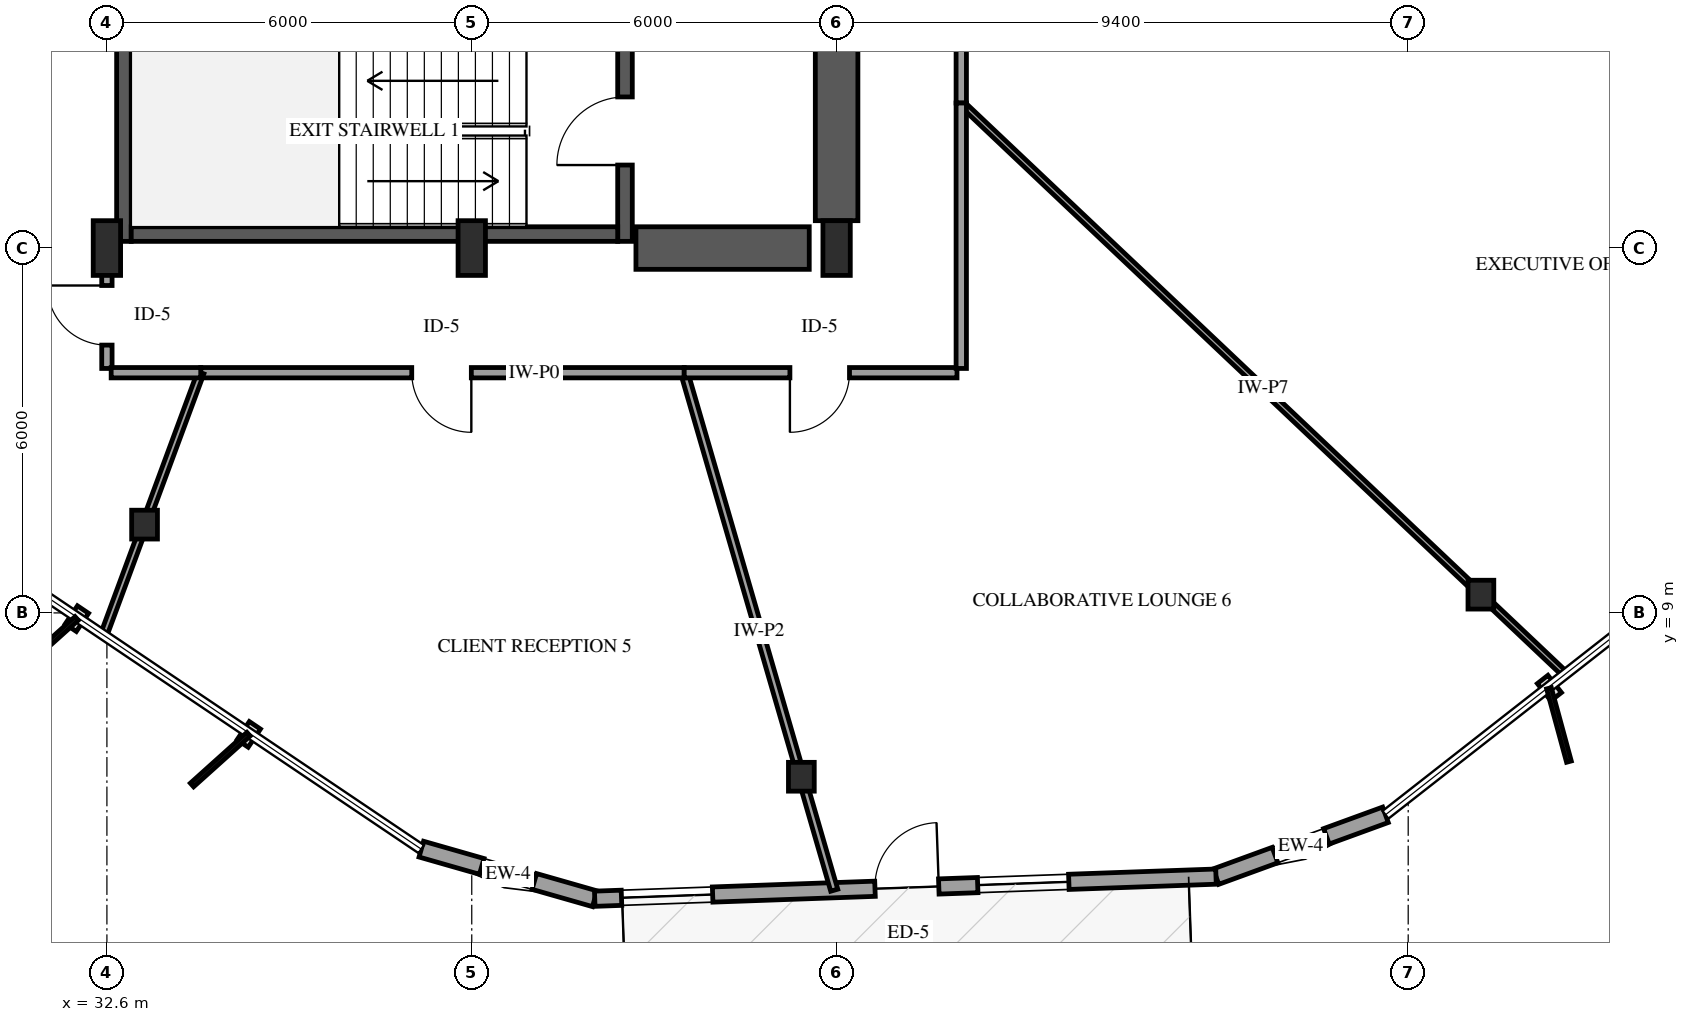
"""IFC4 building model, lengths in metres.
Left out: names, types, materials, properties, quantities, classifications, styles, units other than length and angle.
Written with IfcOpenShell. Run it as: python <this file> out.ifc"""

import sys

from ifc_helpers import new_model, si_unit, direction, frame, frame_2d, origin, origin_2d, place, context, subcontext, project, spatial, rectangle, i_section, extrude, element, fill, save


model = new_model("IFC4")
c1 = context("Model", 3, precision=1e-05, world=origin(), true_north=direction((0.0, 1.0)))
c2 = subcontext(c1, "Body", "Model", "MODEL_VIEW")
j1 = project(units=[si_unit("LENGTHUNIT", "METRE"), si_unit("PLANEANGLEUNIT", "RADIAN")], contexts=[c1])
p1 = place(None, origin())
s1 = spatial("IfcSite", under=j1, at=p1, CompositionType="ELEMENT")
p2 = place(p1, origin())
s2 = spatial("IfcBuilding", under=s1, at=p2, CompositionType="ELEMENT")
p3 = place(p2, frame((0.0, 0.0, 34.6)))
s3 = spatial("IfcBuildingStorey", under=s2, at=p3, CompositionType="ELEMENT", Elevation=34.6)
p4 = place(p3, frame((32.88, 15.11, 0.0), z_axis=(0.0, 0.0, 1.0), x_axis=(0.0, 1.0, 0.0)))
e1 = element("IfcWall", 1, at=p4, inside=s3, PredefinedType="SHEAR", context=c2, shape_type="SweptSolid", body=[
    extrude(rectangle(XDim=3.63, YDim=0.24, at=frame_2d((1.815, 0.0))), origin(), (0.0, 0.0, 1.0), 4.0),
])
p5 = place(p3, frame((41.12, 15.11, 0.0), z_axis=(0.0, 0.0, 1.0), x_axis=(0.0, 1.0, 0.0)))
e2 = element("IfcWall", 2, at=p5, inside=s3, PredefinedType="SHEAR", context=c2, shape_type="SweptSolid", body=[
    extrude(rectangle(XDim=3.63, YDim=0.24, at=frame_2d((1.815, 0.0))), origin(), (0.0, 0.0, 1.0), 4.0),
])
p6 = place(p5, frame((1.255, 0.0, 0.0)))
e3 = element("IfcOpeningElement", 3, at=p6, cuts=e2, PredefinedType="OPENING", context=c2, shape_type="SweptSolid", body=[
    extrude(rectangle(XDim=1.12, YDim=2.15, at=frame_2d((0.56, 1.075))), frame((0.0, 0.13, 0.0), z_axis=(0.0, -1.0, 0.0), x_axis=(1.0, 0.0, 0.0)), (0.0, 0.0, 1.0), 0.26),
])
p7 = place(p3, frame((33.0, 15.23, 0.0), z_axis=(0.0, 0.0, 1.0), x_axis=(1.0, 0.0, 0.0)))
e4 = element("IfcWall", 4, at=p7, inside=s3, PredefinedType="SHEAR", context=c2, shape_type="SweptSolid", body=[
    extrude(rectangle(XDim=8.0, YDim=0.24, at=frame_2d((4.0, 0.0))), origin(), (0.0, 0.0, 1.0), 4.0),
])
p8 = place(p3, frame((41.3, 15.0, 0.0), z_axis=(0.0, 0.0, 1.0), x_axis=(1.0, 0.0, 0.0)))
e5 = element("IfcWall", 5, at=p8, inside=s3, PredefinedType="SHEAR", context=c2, shape_type="SweptSolid", body=[
    extrude(rectangle(XDim=2.85, YDim=0.7, at=frame_2d((1.425, 0.0))), origin(), (0.0, 0.0, 1.0), 4.0),
])
p9 = place(p3, frame((44.6, 15.45, 0.0), z_axis=(0.0, 0.0, 1.0), x_axis=(0.0, 1.0, 0.0)))
e6 = element("IfcWall", 6, at=p9, inside=s3, PredefinedType="SHEAR", context=c2, shape_type="SweptSolid", body=[
    extrude(rectangle(XDim=6.35, YDim=0.7, at=frame_2d((3.175, 0.0))), origin(), (0.0, 0.0, 1.0), 4.0),
])
for number, where, z_axis, x_axis in (
    (7, (32.6, 15.0, 0.0), (0.0, 0.0, 1.0), (1.0, 0.0, 0.0)),
    (8, (38.6, 15.0, 0.0), (0.0, 0.0, 1.0), (1.0, 0.0, 0.0)),
    (9, (44.6, 15.0, 0.0), (0.0, 0.0, 1.0), (1.0, 0.0, 0.0)),
):
    element("IfcColumn", number, at=place(p3, frame(where, z_axis=z_axis, x_axis=x_axis)), inside=s3, PredefinedType="PILASTER", context=c2, shape_type="SweptSolid", body=[
        extrude(rectangle(XDim=0.45, YDim=0.9, at=origin_2d()), origin(), (0.0, 0.0, 1.0), 4.0),
    ])
for number, where, z_axis, x_axis in (
    (10, (33.219, 10.452, 0.0), (0.0, 0.0, 1.0), (1.0, 0.0, 0.0)),
    (11, (44.02, 6.306, 0.0), (0.0, 0.0, 1.0), (1.0, 0.0, 0.0)),
    (12, (55.196, 9.3, 0.0), (0.0, 0.0, 1.0), (1.0, 0.0, 0.0)),
):
    element("IfcColumn", number, at=place(p3, frame(where, z_axis=z_axis, x_axis=x_axis)), inside=s3, PredefinedType="COLUMN", context=c2, shape_type="SweptSolid", body=[
        extrude(i_section(OverallWidth=0.424, OverallDepth=0.474, WebThickness=0.048, FlangeThickness=0.077, FilletRadius=0.038, at=origin_2d()), origin(), (0.0, 0.0, 1.0), 4.0),
    ])
p10 = place(p3, frame((37.771, 5.115, 0.0), z_axis=(0.0, 0.0, 1.0), x_axis=(0.961452483174, -0.274971130481, 0.0)))
e13 = element("IfcWall", 13, at=p10, inside=s3, PredefinedType="SOLIDWALL", context=c2, shape_type="SweptSolid", body=[
    extrude(rectangle(XDim=2.966, YDim=0.27, at=frame_2d((1.483, 0.0))), origin(), (0.0, 0.0, 1.0), 3.079),
])
p11 = place(p10, frame((1.033, 0.0, 0.75)))
e14 = element("IfcOpeningElement", 14, at=p11, cuts=e13, PredefinedType="OPENING", context=c2, shape_type="SweptSolid", body=[
    extrude(rectangle(XDim=0.9, YDim=1.5, at=frame_2d((0.45, 0.75))), frame((0.0, 0.145, 0.0), z_axis=(0.0, -1.0, 0.0), x_axis=(1.0, 0.0, 0.0)), (0.0, 0.0, 1.0), 0.29),
])
p12 = place(p3, frame((50.839, 4.663, 0.0), z_axis=(0.0, 0.0, 1.0), x_axis=(0.939456588186, 0.342667942642, 0.0)))
e15 = element("IfcWall", 15, at=p12, inside=s3, PredefinedType="SOLIDWALL", context=c2, shape_type="SweptSolid", body=[
    extrude(rectangle(XDim=2.967, YDim=0.27, at=frame_2d((1.483, 0.0))), origin(), (0.0, 0.0, 1.0), 3.079),
])
p13 = place(p12, frame((1.033, 0.0, 0.75)))
e16 = element("IfcOpeningElement", 16, at=p13, cuts=e15, PredefinedType="OPENING", context=c2, shape_type="SweptSolid", body=[
    extrude(rectangle(XDim=0.9, YDim=1.5, at=frame_2d((0.45, 0.75))), frame((0.0, 0.145, 0.0), z_axis=(0.0, -1.0, 0.0), x_axis=(1.0, 0.0, 0.0)), (0.0, 0.0, 1.0), 0.29),
])
p14 = place(p3, frame((40.623, 4.3, 0.0), z_axis=(0.0, 0.0, 1.0), x_axis=(0.999366712114, 0.035583348891, 0.0)))
e17 = element("IfcWall", 17, at=p14, inside=s3, PredefinedType="SOLIDWALL", context=c2, shape_type="SweptSolid", body=[
    extrude(rectangle(XDim=10.223, YDim=0.25, at=frame_2d((5.112, 0.0))), origin(), (0.0, 0.0, 1.0), 3.079),
])
p15 = place(p14, frame((4.612, 0.0, 0.0)))
e18 = element("IfcOpeningElement", 18, at=p15, cuts=e17, PredefinedType="OPENING", context=c2, shape_type="SweptSolid", body=[
    extrude(rectangle(XDim=1.05, YDim=2.15, at=frame_2d((0.525, 1.075))), frame((0.0, 0.135, 0.0), z_axis=(0.0, -1.0, 0.0), x_axis=(1.0, 0.0, 0.0)), (0.0, 0.0, 1.0), 0.27),
])
p16 = place(p14, frame((0.44, 0.0, 0.72)))
e19 = element("IfcOpeningElement", 19, at=p16, cuts=e17, PredefinedType="OPENING", context=c2, shape_type="SweptSolid", body=[
    extrude(rectangle(XDim=1.5, YDim=1.7, at=frame_2d((0.75, 0.85))), frame((0.0, 0.135, 0.0), z_axis=(0.0, -1.0, 0.0), x_axis=(1.0, 0.0, 0.0)), (0.0, 0.0, 1.0), 0.27),
])
p17 = place(p14, frame((6.302, 0.0, 0.72)))
e20 = element("IfcOpeningElement", 20, at=p17, cuts=e17, PredefinedType="OPENING", context=c2, shape_type="SweptSolid", body=[
    extrude(rectangle(XDim=1.5, YDim=1.7, at=frame_2d((0.75, 0.85))), frame((0.0, 0.135, 0.0), z_axis=(0.0, -1.0, 0.0), x_axis=(1.0, 0.0, 0.0)), (0.0, 0.0, 1.0), 0.27),
])
p18 = place(p3, frame((46.65, 22.738, 0.0), z_axis=(0.0, 0.0, 1.0), x_axis=(0.962725350361, -0.270480867666, 0.0)))
e21 = element("IfcWall", 21, at=p18, inside=s3, PredefinedType="PARTITIONING", context=c2, shape_type="SweptSolid", body=[
    extrude(rectangle(XDim=18.323, YDim=0.11, at=frame_2d((9.162, 0.0))), origin(), (0.0, 0.0, 1.0), 2.995),
])
p19 = place(p3, frame((46.65, 17.385, 0.0), z_axis=(0.0, 0.0, 1.0), x_axis=(0.726445282298, -0.687224309688, 0.0)))
e22 = element("IfcWall", 22, at=p19, inside=s3, PredefinedType="PARTITIONING", context=c2, shape_type="SweptSolid", body=[
    extrude(rectangle(XDim=13.669, YDim=0.1, at=frame_2d((6.835, 0.0))), origin(), (0.0, 0.0, 1.0), 2.995),
])
p20 = place(p3, frame((42.094, 12.95, 0.0), z_axis=(0.0, 0.0, 1.0), x_axis=(0.278434728373, -0.960455153579, 0.0)))
e23 = element("IfcWall", 23, at=p20, inside=s3, PredefinedType="PARTITIONING", context=c2, shape_type="SweptSolid", body=[
    extrude(rectangle(XDim=8.86, YDim=0.12, at=frame_2d((4.43, 0.0))), origin(), (0.0, 0.0, 1.0), 2.995),
])
p21 = place(p3, frame((42.094, 12.95, 0.0), z_axis=(0.0, 0.0, 1.0), x_axis=(-1.0, 0.0, 0.0)))
e24 = element("IfcWall", 24, at=p21, inside=s3, PredefinedType="PARTITIONING", context=c2, shape_type="SweptSolid", body=[
    extrude(rectangle(XDim=7.951, YDim=0.17, at=frame_2d((3.976, 0.0))), origin(), (0.0, 0.0, 1.0), 3.7),
])
p22 = place(p21, frame((3.501, 0.0, 0.0)))
e25 = element("IfcOpeningElement", 25, at=p22, cuts=e24, PredefinedType="OPENING", context=c2, shape_type="SweptSolid", body=[
    extrude(rectangle(XDim=0.98, YDim=2.15, at=frame_2d((0.49, 1.075))), frame((0.0, 0.095, 0.0), z_axis=(0.0, -1.0, 0.0), x_axis=(1.0, 0.0, 0.0)), (0.0, 0.0, 1.0), 0.19),
])
p23 = place(p3, frame((46.65, 22.738, 0.0), z_axis=(0.0, 0.0, 1.0), x_axis=(0.0, -1.0, 0.0)))
e26 = element("IfcWall", 26, at=p23, inside=s3, PredefinedType="PARTITIONING", context=c2, shape_type="SweptSolid", body=[
    extrude(rectangle(XDim=5.353, YDim=0.17, at=frame_2d((2.677, 0.0))), origin(), (0.0, 0.0, 1.0), 3.7),
])
p24 = place(p23, frame((2.201, 0.0, 0.0)))
e27 = element("IfcOpeningElement", 27, at=p24, cuts=e26, PredefinedType="OPENING", context=c2, shape_type="SweptSolid", body=[
    extrude(rectangle(XDim=0.98, YDim=2.15, at=frame_2d((0.49, 1.075))), frame((0.0, 0.095, 0.0), z_axis=(0.0, -1.0, 0.0), x_axis=(1.0, 0.0, 0.0)), (0.0, 0.0, 1.0), 0.19),
])
p25 = place(p3, frame((34.143, 12.95, 0.0), z_axis=(0.0, 0.0, 1.0), x_axis=(-0.347062077262, -0.937842158642, 0.0)))
e28 = element("IfcWall", 28, at=p25, inside=s3, PredefinedType="PARTITIONING", context=c2, shape_type="SweptSolid", body=[
    extrude(rectangle(XDim=4.602, YDim=0.11, at=frame_2d((2.301, 0.0))), origin(), (0.0, 0.0, 1.0), 2.995),
])
p26 = place(p3, frame((46.58, 12.95, 0.0), z_axis=(0.0, 0.0, 1.0), x_axis=(-1.0, 0.0, 0.0)))
e29 = element("IfcWall", 29, at=p26, inside=s3, PredefinedType="PARTITIONING", context=c2, shape_type="SweptSolid", body=[
    extrude(rectangle(XDim=4.486, YDim=0.17, at=frame_2d((2.243, 0.0))), origin(), (0.0, 0.0, 1.0), 3.7),
])
p27 = place(p26, frame((1.768, 0.0, 0.0)))
e30 = element("IfcOpeningElement", 30, at=p27, cuts=e29, PredefinedType="OPENING", context=c2, shape_type="SweptSolid", body=[
    extrude(rectangle(XDim=0.98, YDim=2.15, at=frame_2d((0.49, 1.075))), frame((0.0, 0.095, 0.0), z_axis=(0.0, -1.0, 0.0), x_axis=(1.0, 0.0, 0.0)), (0.0, 0.0, 1.0), 0.19),
])
p28 = place(p3, frame((46.65, 17.385, 0.0), z_axis=(0.0, 0.0, 1.0), x_axis=(0.0, -1.0, 0.0)))
e31 = element("IfcWall", 31, at=p28, inside=s3, PredefinedType="PARTITIONING", context=c2, shape_type="SweptSolid", body=[
    extrude(rectangle(XDim=4.365, YDim=0.17, at=frame_2d((2.183, 0.0))), origin(), (0.0, 0.0, 1.0), 3.7),
])
p29 = place(p3, frame((32.6, 13.02, 0.0), z_axis=(0.0, 0.0, 1.0), x_axis=(0.0, 1.0, 0.0)))
e32 = element("IfcWall", 32, at=p29, inside=s3, PredefinedType="PARTITIONING", context=c2, shape_type="SweptSolid", body=[
    extrude(rectangle(XDim=1.91, YDim=0.17, at=frame_2d((0.955, 0.0))), origin(), (0.0, 0.0, 1.0), 3.7),
])
p30 = place(p29, frame((0.384, 0.0, 0.0)))
e33 = element("IfcOpeningElement", 33, at=p30, cuts=e32, PredefinedType="OPENING", context=c2, shape_type="SweptSolid", body=[
    extrude(rectangle(XDim=0.98, YDim=2.15, at=frame_2d((0.49, 1.075))), frame((0.0, 0.095, 0.0), z_axis=(0.0, -1.0, 0.0), x_axis=(1.0, 0.0, 0.0)), (0.0, 0.0, 1.0), 0.19),
])
p31 = place(p3, frame((34.143, 12.95, 0.0), z_axis=(0.0, 0.0, 1.0), x_axis=(-1.0, 0.0, 0.0)))
e34 = element("IfcWall", 34, at=p31, inside=s3, PredefinedType="PARTITIONING", context=c2, shape_type="SweptSolid", body=[
    extrude(rectangle(XDim=1.473, YDim=0.17, at=frame_2d((0.737, 0.0))), origin(), (0.0, 0.0, 1.0), 3.7),
])
p32 = place(p11, origin())
e35 = element("IfcWindow", 35, at=p32, inside=s3, PartitioningType="SINGLE_PANEL", PredefinedType="WINDOW", context=c2, shape_type="SweptSolid", body=[
    extrude(rectangle(XDim=0.9, YDim=1.5, at=frame_2d((0.45, 0.75))), frame((0.0, 0.03, 0.0), z_axis=(0.0, -1.0, 0.0), x_axis=(1.0, 0.0, 0.0)), (0.0, 0.0, 1.0), 0.06),
])
fill(e14, e35)
p33 = place(p13, origin())
e36 = element("IfcWindow", 36, at=p33, inside=s3, PartitioningType="SINGLE_PANEL", PredefinedType="WINDOW", context=c2, shape_type="SweptSolid", body=[
    extrude(rectangle(XDim=0.9, YDim=1.5, at=frame_2d((0.45, 0.75))), frame((0.0, 0.03, 0.0), z_axis=(0.0, -1.0, 0.0), x_axis=(1.0, 0.0, 0.0)), (0.0, 0.0, 1.0), 0.06),
])
fill(e16, e36)
p34 = place(p15, origin())
e37 = element("IfcDoor", 37, at=p34, inside=s3, OperationType="SINGLE_SWING_RIGHT", PredefinedType="DOOR", context=c2, shape_type="SweptSolid", body=[
    extrude(rectangle(XDim=1.05, YDim=2.15, at=frame_2d((0.525, 1.075))), frame((0.0, 0.025, 0.0), z_axis=(0.0, -1.0, 0.0), x_axis=(1.0, 0.0, 0.0)), (0.0, 0.0, 1.0), 0.05),
])
fill(e18, e37)
p35 = place(p16, origin())
e38 = element("IfcWindow", 38, at=p35, inside=s3, PartitioningType="SINGLE_PANEL", PredefinedType="WINDOW", context=c2, shape_type="SweptSolid", body=[
    extrude(rectangle(XDim=1.5, YDim=1.7, at=frame_2d((0.75, 0.85))), frame((0.0, 0.03, 0.0), z_axis=(0.0, -1.0, 0.0), x_axis=(1.0, 0.0, 0.0)), (0.0, 0.0, 1.0), 0.06),
])
fill(e19, e38)
p36 = place(p17, origin())
e39 = element("IfcWindow", 39, at=p36, inside=s3, PartitioningType="SINGLE_PANEL", PredefinedType="WINDOW", context=c2, shape_type="SweptSolid", body=[
    extrude(rectangle(XDim=1.5, YDim=1.7, at=frame_2d((0.75, 0.85))), frame((0.0, 0.03, 0.0), z_axis=(0.0, -1.0, 0.0), x_axis=(1.0, 0.0, 0.0)), (0.0, 0.0, 1.0), 0.06),
])
fill(e20, e39)
p37 = place(p6, origin())
e40 = element("IfcDoor", 40, at=p37, inside=s3, OperationType="SINGLE_SWING_LEFT", PredefinedType="DOOR", context=c2, shape_type="SweptSolid", body=[
    extrude(rectangle(XDim=1.12, YDim=2.15, at=frame_2d((0.56, 1.075))), frame((0.0, 0.025, 0.0), z_axis=(0.0, -1.0, 0.0), x_axis=(1.0, 0.0, 0.0)), (0.0, 0.0, 1.0), 0.05),
])
fill(e3, e40)
p38 = place(p22, origin())
e41 = element("IfcDoor", 41, at=p38, inside=s3, OperationType="SINGLE_SWING_LEFT", PredefinedType="DOOR", context=c2, shape_type="SweptSolid", body=[
    extrude(rectangle(XDim=0.98, YDim=2.15, at=frame_2d((0.49, 1.075))), frame((0.0, 0.025, 0.0), z_axis=(0.0, -1.0, 0.0), x_axis=(1.0, 0.0, 0.0)), (0.0, 0.0, 1.0), 0.05),
])
fill(e25, e41)
p39 = place(p27, origin())
e42 = element("IfcDoor", 42, at=p39, inside=s3, OperationType="SINGLE_SWING_RIGHT", PredefinedType="DOOR", context=c2, shape_type="SweptSolid", body=[
    extrude(rectangle(XDim=0.98, YDim=2.15, at=frame_2d((0.49, 1.075))), frame((0.0, 0.025, 0.0), z_axis=(0.0, -1.0, 0.0), x_axis=(1.0, 0.0, 0.0)), (0.0, 0.0, 1.0), 0.05),
])
fill(e30, e42)
p40 = place(p30, origin())
e43 = element("IfcDoor", 43, at=p40, inside=s3, OperationType="SINGLE_SWING_RIGHT", PredefinedType="DOOR", context=c2, shape_type="SweptSolid", body=[
    extrude(rectangle(XDim=0.98, YDim=2.15, at=frame_2d((0.49, 1.075))), frame((0.0, 0.025, 0.0), z_axis=(0.0, -1.0, 0.0), x_axis=(1.0, 0.0, 0.0)), (0.0, 0.0, 1.0), 0.05),
])
fill(e33, e43)
save(model, sys.argv[1])
